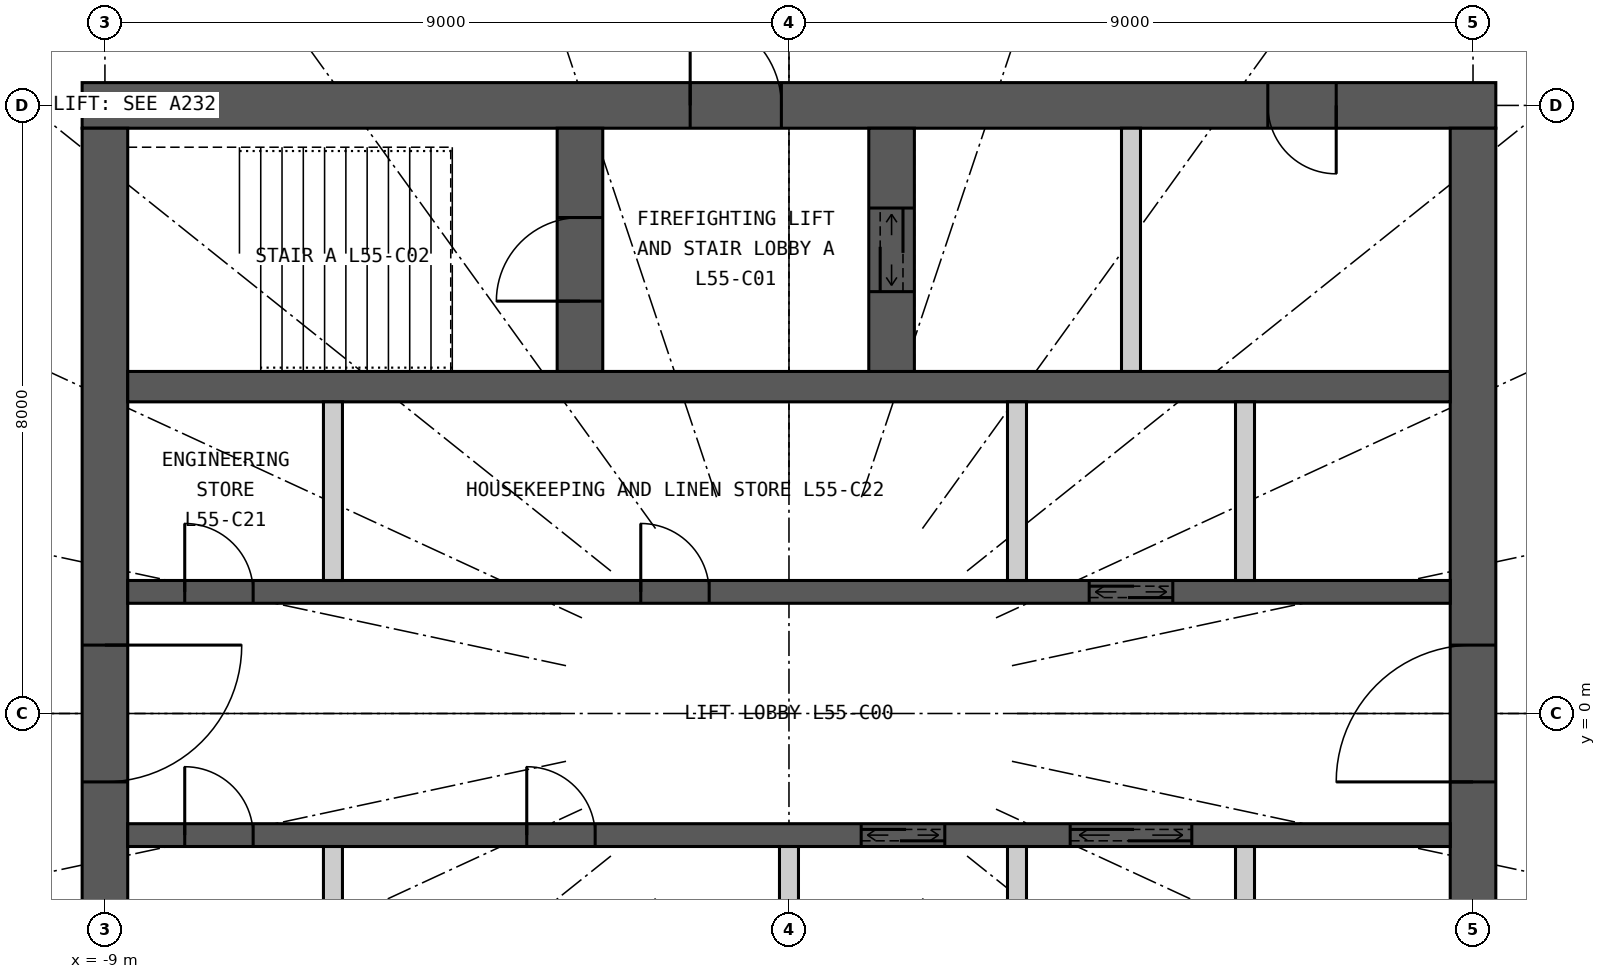
"""IFC4 building model, lengths in metres.
Left out: names, types, materials, properties, quantities, classifications, styles, units other than length and angle.
Written with IfcOpenShell. Run it as: python <this file> out.ifc"""

import sys

from ifc_helpers import new_model, si_unit, direction, frame, frame_2d, origin, place, context, subcontext, project, spatial, rectangle, extrude, element, fill, save


model = new_model("IFC4")
c1 = context("Model", 3, precision=1e-05, world=origin(), true_north=direction((0.0, 1.0)))
c2 = subcontext(c1, "Body", "Model", "MODEL_VIEW")
j1 = project(units=[si_unit("LENGTHUNIT", "METRE"), si_unit("PLANEANGLEUNIT", "RADIAN")], contexts=[c1])
p1 = place(None, origin())
s1 = spatial("IfcSite", under=j1, at=p1, CompositionType="ELEMENT")
p2 = place(p1, origin())
s2 = spatial("IfcBuilding", under=s1, at=p2, CompositionType="ELEMENT")
p3 = place(p2, frame((0.0, 0.0, 206.1)))
s3 = spatial("IfcBuildingStorey", under=s2, at=p3, CompositionType="ELEMENT", Elevation=206.1)
p4 = place(p3, frame((-9.3, 8.0, 0.0), z_axis=(0.0, 0.0, 1.0), x_axis=(1.0, 0.0, 0.0)))
e1 = element("IfcWall", 1, at=p4, inside=s3, PredefinedType="SHEAR", context=c2, shape_type="SweptSolid", body=[
    extrude(rectangle(XDim=18.6, YDim=0.6, at=frame_2d((9.3, 0.0))), origin(), (0.0, 0.0, 1.0), 3.3),
])
p5 = place(p4, frame((8.0, 0.0, 0.0)))
e2 = element("IfcOpeningElement", 2, at=p5, cuts=e1, PredefinedType="OPENING", context=c2, shape_type="SweptSolid", body=[
    extrude(rectangle(XDim=1.2, YDim=2.2, at=frame_2d((0.6, 1.1))), frame((0.0, 0.31, 0.0), z_axis=(0.0, -1.0, 0.0), x_axis=(1.0, 0.0, 0.0)), (0.0, 0.0, 1.0), 0.62),
])
p6 = place(p4, frame((15.6, 0.0, 0.0)))
e3 = element("IfcOpeningElement", 3, at=p6, cuts=e1, PredefinedType="OPENING", context=c2, shape_type="SweptSolid", body=[
    extrude(rectangle(XDim=0.9, YDim=2.2, at=frame_2d((0.45, 1.1))), frame((0.0, 0.31, 0.0), z_axis=(0.0, -1.0, 0.0), x_axis=(1.0, 0.0, 0.0)), (0.0, 0.0, 1.0), 0.62),
])
p7 = place(p3, frame((9.0, -7.7, 0.0), z_axis=(0.0, 0.0, 1.0), x_axis=(0.0, 1.0, 0.0)))
e4 = element("IfcWall", 4, at=p7, inside=s3, PredefinedType="SHEAR", context=c2, shape_type="SweptSolid", body=[
    extrude(rectangle(XDim=15.4, YDim=0.6, at=frame_2d((7.7, 0.0))), origin(), (0.0, 0.0, 1.0), 3.3),
])
p8 = place(p7, frame((6.8, 0.0, 0.0)))
e5 = element("IfcOpeningElement", 5, at=p8, cuts=e4, PredefinedType="OPENING", context=c2, shape_type="SweptSolid", body=[
    extrude(rectangle(XDim=1.8, YDim=2.2, at=frame_2d((0.9, 1.1))), frame((0.0, 0.31, 0.0), z_axis=(0.0, -1.0, 0.0), x_axis=(1.0, 0.0, 0.0)), (0.0, 0.0, 1.0), 0.62),
])
p9 = place(p3, frame((-9.0, 7.7, 0.0), z_axis=(0.0, 0.0, 1.0), x_axis=(0.0, -1.0, 0.0)))
e6 = element("IfcWall", 6, at=p9, inside=s3, PredefinedType="SHEAR", context=c2, shape_type="SweptSolid", body=[
    extrude(rectangle(XDim=15.4, YDim=0.6, at=frame_2d((7.7, 0.0))), origin(), (0.0, 0.0, 1.0), 3.3),
])
p10 = place(p9, frame((6.8, 0.0, 0.0)))
e7 = element("IfcOpeningElement", 7, at=p10, cuts=e6, PredefinedType="OPENING", context=c2, shape_type="SweptSolid", body=[
    extrude(rectangle(XDim=1.8, YDim=2.2, at=frame_2d((0.9, 1.1))), frame((0.0, 0.31, 0.0), z_axis=(0.0, -1.0, 0.0), x_axis=(1.0, 0.0, 0.0)), (0.0, 0.0, 1.0), 0.62),
])
p11 = place(p3, frame((-8.7, 4.3, 0.0), z_axis=(0.0, 0.0, 1.0), x_axis=(1.0, 0.0, 0.0)))
e8 = element("IfcWall", 8, at=p11, inside=s3, PredefinedType="SHEAR", context=c2, shape_type="SweptSolid", body=[
    extrude(rectangle(XDim=17.4, YDim=0.4, at=frame_2d((8.7, 0.0))), origin(), (0.0, 0.0, 1.0), 3.3),
])
p12 = place(p3, frame((-8.7, 1.6, 0.0), z_axis=(0.0, 0.0, 1.0), x_axis=(1.0, 0.0, 0.0)))
e9 = element("IfcWall", 9, at=p12, inside=s3, PredefinedType="SHEAR", context=c2, shape_type="SweptSolid", body=[
    extrude(rectangle(XDim=17.4, YDim=0.3, at=frame_2d((8.7, 0.0))), origin(), (0.0, 0.0, 1.0), 3.3),
])
p13 = place(p12, frame((12.65, 0.0, 0.0)))
e10 = element("IfcOpeningElement", 10, at=p13, cuts=e9, PredefinedType="OPENING", context=c2, shape_type="SweptSolid", body=[
    extrude(rectangle(XDim=1.1, YDim=2.2, at=frame_2d((0.55, 1.1))), frame((0.0, 0.16, 0.0), z_axis=(0.0, -1.0, 0.0), x_axis=(1.0, 0.0, 0.0)), (0.0, 0.0, 1.0), 0.32),
])
p14 = place(p12, frame((0.75, 0.0, 0.0)))
e11 = element("IfcOpeningElement", 11, at=p14, cuts=e9, PredefinedType="OPENING", context=c2, shape_type="SweptSolid", body=[
    extrude(rectangle(XDim=0.9, YDim=2.2, at=frame_2d((0.45, 1.1))), frame((0.0, 0.16, 0.0), z_axis=(0.0, -1.0, 0.0), x_axis=(1.0, 0.0, 0.0)), (0.0, 0.0, 1.0), 0.32),
])
p15 = place(p12, frame((6.75, 0.0, 0.0)))
e12 = element("IfcOpeningElement", 12, at=p15, cuts=e9, PredefinedType="OPENING", context=c2, shape_type="SweptSolid", body=[
    extrude(rectangle(XDim=0.9, YDim=2.2, at=frame_2d((0.45, 1.1))), frame((0.0, 0.16, 0.0), z_axis=(0.0, -1.0, 0.0), x_axis=(1.0, 0.0, 0.0)), (0.0, 0.0, 1.0), 0.32),
])
p16 = place(p3, frame((-8.7, -1.6, 0.0), z_axis=(0.0, 0.0, 1.0), x_axis=(1.0, 0.0, 0.0)))
e13 = element("IfcWall", 13, at=p16, inside=s3, PredefinedType="SHEAR", context=c2, shape_type="SweptSolid", body=[
    extrude(rectangle(XDim=17.4, YDim=0.3, at=frame_2d((8.7, 0.0))), origin(), (0.0, 0.0, 1.0), 3.3),
])
p17 = place(p16, frame((9.65, 0.0, 0.0)))
e14 = element("IfcOpeningElement", 14, at=p17, cuts=e13, PredefinedType="OPENING", context=c2, shape_type="SweptSolid", body=[
    extrude(rectangle(XDim=1.1, YDim=2.2, at=frame_2d((0.55, 1.1))), frame((0.0, 0.16, 0.0), z_axis=(0.0, -1.0, 0.0), x_axis=(1.0, 0.0, 0.0)), (0.0, 0.0, 1.0), 0.32),
])
p18 = place(p16, frame((12.4, 0.0, 0.0)))
e15 = element("IfcOpeningElement", 15, at=p18, cuts=e13, PredefinedType="OPENING", context=c2, shape_type="SweptSolid", body=[
    extrude(rectangle(XDim=1.6, YDim=2.4, at=frame_2d((0.8, 1.2))), frame((0.0, 0.16, 0.0), z_axis=(0.0, -1.0, 0.0), x_axis=(1.0, 0.0, 0.0)), (0.0, 0.0, 1.0), 0.32),
])
p19 = place(p16, frame((0.75, 0.0, 0.0)))
e16 = element("IfcOpeningElement", 16, at=p19, cuts=e13, PredefinedType="OPENING", context=c2, shape_type="SweptSolid", body=[
    extrude(rectangle(XDim=0.9, YDim=2.2, at=frame_2d((0.45, 1.1))), frame((0.0, 0.16, 0.0), z_axis=(0.0, -1.0, 0.0), x_axis=(1.0, 0.0, 0.0)), (0.0, 0.0, 1.0), 0.32),
])
p20 = place(p16, frame((5.25, 0.0, 0.0)))
e17 = element("IfcOpeningElement", 17, at=p20, cuts=e13, PredefinedType="OPENING", context=c2, shape_type="SweptSolid", body=[
    extrude(rectangle(XDim=0.9, YDim=2.2, at=frame_2d((0.45, 1.1))), frame((0.0, 0.16, 0.0), z_axis=(0.0, -1.0, 0.0), x_axis=(1.0, 0.0, 0.0)), (0.0, 0.0, 1.0), 0.32),
])
p21 = place(p3, frame((-2.75, 4.5, 0.0), z_axis=(0.0, 0.0, 1.0), x_axis=(0.0, 1.0, 0.0)))
e18 = element("IfcWall", 18, at=p21, inside=s3, PredefinedType="SHEAR", context=c2, shape_type="SweptSolid", body=[
    extrude(rectangle(XDim=3.2, YDim=0.6, at=frame_2d((1.6, 0.0))), origin(), (0.0, 0.0, 1.0), 3.3),
])
p22 = place(p21, frame((0.925, 0.0, 0.0)))
e19 = element("IfcOpeningElement", 19, at=p22, cuts=e18, PredefinedType="OPENING", context=c2, shape_type="SweptSolid", body=[
    extrude(rectangle(XDim=1.1, YDim=2.2, at=frame_2d((0.55, 1.1))), frame((0.0, 0.31, 0.0), z_axis=(0.0, -1.0, 0.0), x_axis=(1.0, 0.0, 0.0)), (0.0, 0.0, 1.0), 0.62),
])
p23 = place(p3, frame((1.35, 4.5, 0.0), z_axis=(0.0, 0.0, 1.0), x_axis=(0.0, 1.0, 0.0)))
e20 = element("IfcWall", 20, at=p23, inside=s3, PredefinedType="SHEAR", context=c2, shape_type="SweptSolid", body=[
    extrude(rectangle(XDim=3.2, YDim=0.6, at=frame_2d((1.6, 0.0))), origin(), (0.0, 0.0, 1.0), 3.3),
])
p24 = place(p23, frame((1.05, 0.0, 0.0)))
e21 = element("IfcOpeningElement", 21, at=p24, cuts=e20, PredefinedType="OPENING", context=c2, shape_type="SweptSolid", body=[
    extrude(rectangle(XDim=1.1, YDim=2.2, at=frame_2d((0.55, 1.1))), frame((0.0, 0.31, 0.0), z_axis=(0.0, -1.0, 0.0), x_axis=(1.0, 0.0, 0.0)), (0.0, 0.0, 1.0), 0.62),
])
p25 = place(p3, frame((4.5, 4.5, 0.0), z_axis=(0.0, 0.0, 1.0), x_axis=(0.0, 1.0, 0.0)))
e22 = element("IfcWall", 22, at=p25, inside=s3, PredefinedType="PARTITIONING", context=c2, shape_type="SweptSolid", body=[
    extrude(rectangle(XDim=3.2, YDim=0.25, at=frame_2d((1.6, 0.0))), origin(), (0.0, 0.0, 1.0), 3.3),
])
for number, where, z_axis, x_axis in (
    (23, (-6.0, 1.75, 0.0), (0.0, 0.0, 1.0), (0.0, 1.0, 0.0)),
    (24, (3.0, 1.75, 0.0), (0.0, 0.0, 1.0), (0.0, 1.0, 0.0)),
    (25, (6.0, 1.75, 0.0), (0.0, 0.0, 1.0), (0.0, 1.0, 0.0)),
    (26, (-6.0, -4.1, 0.0), (0.0, 0.0, 1.0), (0.0, 1.0, 0.0)),
    (27, (0.0, -4.1, 0.0), (0.0, 0.0, 1.0), (0.0, 1.0, 0.0)),
    (28, (3.0, -4.1, 0.0), (0.0, 0.0, 1.0), (0.0, 1.0, 0.0)),
    (29, (6.0, -4.1, 0.0), (0.0, 0.0, 1.0), (0.0, 1.0, 0.0)),
):
    element("IfcWall", number, at=place(p3, frame(where, z_axis=z_axis, x_axis=x_axis)), inside=s3, PredefinedType="PARTITIONING", context=c2, shape_type="SweptSolid", body=[
        extrude(rectangle(XDim=2.35, YDim=0.25, at=frame_2d((1.175, 0.0))), origin(), (0.0, 0.0, 1.0), 3.3),
    ])
p26 = place(p5, origin())
e30 = element("IfcDoor", 30, at=p26, inside=s3, OperationType="SINGLE_SWING_LEFT", PredefinedType="DOOR", context=c2, shape_type="SweptSolid", body=[
    extrude(rectangle(XDim=1.2, YDim=2.2, at=frame_2d((0.6, 1.1))), frame((0.0, 0.025, 0.0), z_axis=(0.0, -1.0, 0.0), x_axis=(1.0, 0.0, 0.0)), (0.0, 0.0, 1.0), 0.05),
])
fill(e2, e30)
p27 = place(p22, origin())
e31 = element("IfcDoor", 31, at=p27, inside=s3, OperationType="SINGLE_SWING_LEFT", PredefinedType="DOOR", context=c2, shape_type="SweptSolid", body=[
    extrude(rectangle(XDim=1.1, YDim=2.2, at=frame_2d((0.55, 1.1))), frame((0.0, 0.025, 0.0), z_axis=(0.0, -1.0, 0.0), x_axis=(1.0, 0.0, 0.0)), (0.0, 0.0, 1.0), 0.05),
])
fill(e19, e31)
p28 = place(p24, origin())
e32 = element("IfcDoor", 32, at=p28, inside=s3, OperationType="DOUBLE_DOOR_SLIDING", PredefinedType="DOOR", context=c2, shape_type="SweptSolid", body=[
    extrude(rectangle(XDim=1.1, YDim=2.2, at=frame_2d((0.55, 1.1))), frame((0.0, 0.025, 0.0), z_axis=(0.0, -1.0, 0.0), x_axis=(1.0, 0.0, 0.0)), (0.0, 0.0, 1.0), 0.05),
])
fill(e21, e32)
p29 = place(p6, origin())
e33 = element("IfcDoor", 33, at=p29, inside=s3, OperationType="SINGLE_SWING_RIGHT", PredefinedType="DOOR", context=c2, shape_type="SweptSolid", body=[
    extrude(rectangle(XDim=0.9, YDim=2.2, at=frame_2d((0.45, 1.1))), frame((0.0, 0.025, 0.0), z_axis=(0.0, -1.0, 0.0), x_axis=(1.0, 0.0, 0.0)), (0.0, 0.0, 1.0), 0.05),
])
fill(e3, e33)
p30 = place(p13, origin())
e34 = element("IfcDoor", 34, at=p30, inside=s3, OperationType="DOUBLE_DOOR_SLIDING", PredefinedType="DOOR", context=c2, shape_type="SweptSolid", body=[
    extrude(rectangle(XDim=1.1, YDim=2.2, at=frame_2d((0.55, 1.1))), frame((0.0, 0.025, 0.0), z_axis=(0.0, -1.0, 0.0), x_axis=(1.0, 0.0, 0.0)), (0.0, 0.0, 1.0), 0.05),
])
fill(e10, e34)
p31 = place(p17, origin())
e35 = element("IfcDoor", 35, at=p31, inside=s3, OperationType="DOUBLE_DOOR_SLIDING", PredefinedType="DOOR", context=c2, shape_type="SweptSolid", body=[
    extrude(rectangle(XDim=1.1, YDim=2.2, at=frame_2d((0.55, 1.1))), frame((0.0, 0.025, 0.0), z_axis=(0.0, -1.0, 0.0), x_axis=(1.0, 0.0, 0.0)), (0.0, 0.0, 1.0), 0.05),
])
fill(e14, e35)
p32 = place(p18, origin())
e36 = element("IfcDoor", 36, at=p32, inside=s3, OperationType="DOUBLE_DOOR_SLIDING", PredefinedType="DOOR", context=c2, shape_type="SweptSolid", body=[
    extrude(rectangle(XDim=1.6, YDim=2.4, at=frame_2d((0.8, 1.2))), frame((0.0, 0.025, 0.0), z_axis=(0.0, -1.0, 0.0), x_axis=(1.0, 0.0, 0.0)), (0.0, 0.0, 1.0), 0.05),
])
fill(e15, e36)
p33 = place(p14, origin())
e37 = element("IfcDoor", 37, at=p33, inside=s3, OperationType="SINGLE_SWING_LEFT", PredefinedType="DOOR", context=c2, shape_type="SweptSolid", body=[
    extrude(rectangle(XDim=0.9, YDim=2.2, at=frame_2d((0.45, 1.1))), frame((0.0, 0.025, 0.0), z_axis=(0.0, -1.0, 0.0), x_axis=(1.0, 0.0, 0.0)), (0.0, 0.0, 1.0), 0.05),
])
fill(e11, e37)
p34 = place(p15, origin())
e38 = element("IfcDoor", 38, at=p34, inside=s3, OperationType="SINGLE_SWING_LEFT", PredefinedType="DOOR", context=c2, shape_type="SweptSolid", body=[
    extrude(rectangle(XDim=0.9, YDim=2.2, at=frame_2d((0.45, 1.1))), frame((0.0, 0.025, 0.0), z_axis=(0.0, -1.0, 0.0), x_axis=(1.0, 0.0, 0.0)), (0.0, 0.0, 1.0), 0.05),
])
fill(e12, e38)
p35 = place(p19, origin())
e39 = element("IfcDoor", 39, at=p35, inside=s3, OperationType="SINGLE_SWING_LEFT", PredefinedType="DOOR", context=c2, shape_type="SweptSolid", body=[
    extrude(rectangle(XDim=0.9, YDim=2.2, at=frame_2d((0.45, 1.1))), frame((0.0, 0.025, 0.0), z_axis=(0.0, -1.0, 0.0), x_axis=(1.0, 0.0, 0.0)), (0.0, 0.0, 1.0), 0.05),
])
fill(e16, e39)
p36 = place(p20, origin())
e40 = element("IfcDoor", 40, at=p36, inside=s3, OperationType="SINGLE_SWING_LEFT", PredefinedType="DOOR", context=c2, shape_type="SweptSolid", body=[
    extrude(rectangle(XDim=0.9, YDim=2.2, at=frame_2d((0.45, 1.1))), frame((0.0, 0.025, 0.0), z_axis=(0.0, -1.0, 0.0), x_axis=(1.0, 0.0, 0.0)), (0.0, 0.0, 1.0), 0.05),
])
fill(e17, e40)
p37 = place(p8, origin())
e41 = element("IfcDoor", 41, at=p37, inside=s3, OperationType="DOUBLE_DOOR_DOUBLE_SWING", PredefinedType="DOOR", context=c2, shape_type="SweptSolid", body=[
    extrude(rectangle(XDim=1.8, YDim=2.2, at=frame_2d((0.9, 1.1))), frame((0.0, 0.025, 0.0), z_axis=(0.0, -1.0, 0.0), x_axis=(1.0, 0.0, 0.0)), (0.0, 0.0, 1.0), 0.05),
])
fill(e5, e41)
p38 = place(p10, origin())
e42 = element("IfcDoor", 42, at=p38, inside=s3, OperationType="DOUBLE_DOOR_DOUBLE_SWING", PredefinedType="DOOR", context=c2, shape_type="SweptSolid", body=[
    extrude(rectangle(XDim=1.8, YDim=2.2, at=frame_2d((0.9, 1.1))), frame((0.0, 0.025, 0.0), z_axis=(0.0, -1.0, 0.0), x_axis=(1.0, 0.0, 0.0)), (0.0, 0.0, 1.0), 0.05),
])
fill(e7, e42)
save(model, sys.argv[1])
